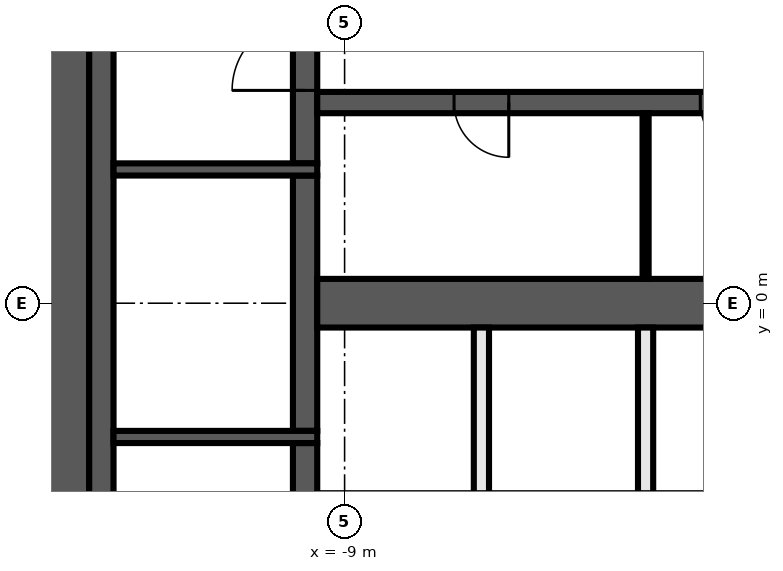
"""IFC4 building model, lengths in metres.
Left out: names, types, materials, properties, quantities, classifications, styles, units other than length and angle.
Written with IfcOpenShell. Run it as: python <this file> out.ifc"""

import sys

from ifc_helpers import new_model, si_unit, direction, frame, frame_2d, origin, place, context, subcontext, project, spatial, rectangle, extrude, element, fill, save


model = new_model("IFC4")
c1 = context("Model", 3, precision=1e-05, world=origin(), true_north=direction((0.0, 1.0)))
c2 = subcontext(c1, "Body", "Model", "MODEL_VIEW")
j1 = project(units=[si_unit("LENGTHUNIT", "METRE"), si_unit("PLANEANGLEUNIT", "RADIAN")], contexts=[c1])
p1 = place(None, origin())
s1 = spatial("IfcSite", under=j1, at=p1, CompositionType="ELEMENT")
p2 = place(p1, origin())
s2 = spatial("IfcBuilding", under=s1, at=p2, CompositionType="ELEMENT")
p3 = place(p2, frame((0.0, 0.0, 162.8)))
s3 = spatial("IfcBuildingStorey", under=s2, at=p3, CompositionType="ELEMENT", Elevation=162.8)
p4 = place(p3, frame((-13.6, -10.2, 0.0), z_axis=(0.0, 0.0, 1.0), x_axis=(0.0, 1.0, 0.0)))
e1 = element("IfcWall", 1, at=p4, inside=s3, PredefinedType="SHEAR", context=c2, shape_type="SweptSolid", body=[
    extrude(rectangle(XDim=20.4, YDim=0.8, at=frame_2d((10.2, 0.0))), origin(), (0.0, 0.0, 1.0), 3.82),
])
p5 = place(p3, frame((-13.0, -9.8, 0.0), z_axis=(0.0, 0.0, 1.0), x_axis=(0.0, 1.0, 0.0)))
e2 = element("IfcWall", 2, at=p5, inside=s3, PredefinedType="SHEAR", context=c2, shape_type="SweptSolid", body=[
    extrude(rectangle(XDim=19.6, YDim=0.4, at=frame_2d((9.8, 0.0))), origin(), (0.0, 0.0, 1.0), 3.82),
])
p6 = place(p3, frame((-9.65, -9.8, 0.0), z_axis=(0.0, 0.0, 1.0), x_axis=(0.0, 1.0, 0.0)))
e3 = element("IfcWall", 3, at=p6, inside=s3, PredefinedType="SHEAR", context=c2, shape_type="SweptSolid", body=[
    extrude(rectangle(XDim=7.5, YDim=0.4, at=frame_2d((3.75, 0.0))), origin(), (0.0, 0.0, 1.0), 3.82),
])
p7 = place(p6, frame((5.1, 0.0, 0.0)))
e4 = element("IfcOpeningElement", 4, at=p7, cuts=e3, PredefinedType="OPENING", context=c2, shape_type="SweptSolid", body=[
    extrude(rectangle(XDim=1.2, YDim=2.1, at=frame_2d((0.6, 1.05))), frame((0.0, 0.21, 0.0), z_axis=(0.0, -1.0, 0.0), x_axis=(1.0, 0.0, 0.0)), (0.0, 0.0, 1.0), 0.42),
])
p8 = place(p3, frame((-9.65, -2.1, 0.0), z_axis=(0.0, 0.0, 1.0), x_axis=(0.0, 1.0, 0.0)))
e5 = element("IfcWall", 5, at=p8, inside=s3, PredefinedType="SHEAR", context=c2, shape_type="SweptSolid", body=[
    extrude(rectangle(XDim=4.2, YDim=0.4, at=frame_2d((2.1, 0.0))), origin(), (0.0, 0.0, 1.0), 3.82),
])
p9 = place(p3, frame((-9.65, 2.3, 0.0), z_axis=(0.0, 0.0, 1.0), x_axis=(0.0, 1.0, 0.0)))
e6 = element("IfcWall", 6, at=p9, inside=s3, PredefinedType="SHEAR", context=c2, shape_type="SweptSolid", body=[
    extrude(rectangle(XDim=7.5, YDim=0.4, at=frame_2d((3.75, 0.0))), origin(), (0.0, 0.0, 1.0), 3.82),
])
p10 = place(p9, frame((1.2, 0.0, 0.0)))
e7 = element("IfcOpeningElement", 7, at=p10, cuts=e6, PredefinedType="OPENING", context=c2, shape_type="SweptSolid", body=[
    extrude(rectangle(XDim=1.2, YDim=2.1, at=frame_2d((0.6, 1.05))), frame((0.0, 0.21, 0.0), z_axis=(0.0, -1.0, 0.0), x_axis=(1.0, 0.0, 0.0)), (0.0, 0.0, 1.0), 0.42),
])
for number, where, z_axis, x_axis in (
    (8, (-9.45, 2.2, 0.0), (0.0, 0.0, 1.0), (-1.0, 0.0, 0.0)),
    (9, (-9.45, -2.2, 0.0), (0.0, 0.0, 1.0), (-1.0, 0.0, 0.0)),
):
    element("IfcWall", number, at=place(p3, frame(where, z_axis=z_axis, x_axis=x_axis)), inside=s3, PredefinedType="SHEAR", context=c2, shape_type="SweptSolid", body=[
        extrude(rectangle(XDim=3.35, YDim=0.2, at=frame_2d((1.675, 0.0))), origin(), (0.0, 0.0, 1.0), 3.82),
    ])
p11 = place(p3, frame((9.45, 3.3, 0.0), z_axis=(0.0, 0.0, 1.0), x_axis=(-1.0, 0.0, 0.0)))
e10 = element("IfcWall", 10, at=p11, inside=s3, PredefinedType="SHEAR", context=c2, shape_type="SweptSolid", body=[
    extrude(rectangle(XDim=18.9, YDim=0.35, at=frame_2d((9.45, 0.0))), origin(), (0.0, 0.0, 1.0), 3.82),
])
p12 = place(p11, frame((6.2, 0.0, 0.0)))
e11 = element("IfcOpeningElement", 11, at=p12, cuts=e10, PredefinedType="OPENING", context=c2, shape_type="SweptSolid", body=[
    extrude(rectangle(XDim=1.1, YDim=2.1, at=frame_2d((0.55, 1.05))), frame((0.0, 0.185, 0.0), z_axis=(0.0, -1.0, 0.0), x_axis=(1.0, 0.0, 0.0)), (0.0, 0.0, 1.0), 0.37),
])
p13 = place(p11, frame((3.5, 0.0, 0.0)))
e12 = element("IfcOpeningElement", 12, at=p13, cuts=e10, PredefinedType="OPENING", context=c2, shape_type="SweptSolid", body=[
    extrude(rectangle(XDim=1.1, YDim=2.1, at=frame_2d((0.55, 1.05))), frame((0.0, 0.185, 0.0), z_axis=(0.0, -1.0, 0.0), x_axis=(1.0, 0.0, 0.0)), (0.0, 0.0, 1.0), 0.37),
])
p14 = place(p11, frame((0.9, 0.0, 0.0)))
e13 = element("IfcOpeningElement", 13, at=p14, cuts=e10, PredefinedType="OPENING", context=c2, shape_type="SweptSolid", body=[
    extrude(rectangle(XDim=0.9, YDim=2.1, at=frame_2d((0.45, 1.05))), frame((0.0, 0.185, 0.0), z_axis=(0.0, -1.0, 0.0), x_axis=(1.0, 0.0, 0.0)), (0.0, 0.0, 1.0), 0.37),
])
p15 = place(p11, frame((15.75, 0.0, 0.0)))
e14 = element("IfcOpeningElement", 14, at=p15, cuts=e10, PredefinedType="OPENING", context=c2, shape_type="SweptSolid", body=[
    extrude(rectangle(XDim=0.9, YDim=2.1, at=frame_2d((0.45, 1.05))), frame((0.0, 0.185, 0.0), z_axis=(0.0, -1.0, 0.0), x_axis=(1.0, 0.0, 0.0)), (0.0, 0.0, 1.0), 0.37),
])
p16 = place(p11, frame((11.7, 0.0, 0.0)))
e15 = element("IfcOpeningElement", 15, at=p16, cuts=e10, PredefinedType="OPENING", context=c2, shape_type="SweptSolid", body=[
    extrude(rectangle(XDim=0.9, YDim=2.1, at=frame_2d((0.45, 1.05))), frame((0.0, 0.185, 0.0), z_axis=(0.0, -1.0, 0.0), x_axis=(1.0, 0.0, 0.0)), (0.0, 0.0, 1.0), 0.37),
])
p17 = place(p11, frame((9.0, 0.0, 0.0)))
e16 = element("IfcOpeningElement", 16, at=p17, cuts=e10, PredefinedType="OPENING", context=c2, shape_type="SweptSolid", body=[
    extrude(rectangle(XDim=0.9, YDim=2.1, at=frame_2d((0.45, 1.05))), frame((0.0, 0.185, 0.0), z_axis=(0.0, -1.0, 0.0), x_axis=(1.0, 0.0, 0.0)), (0.0, 0.0, 1.0), 0.37),
])
p18 = place(p3, frame((-9.45, 0.0, 0.0), z_axis=(0.0, 0.0, 1.0), x_axis=(1.0, 0.0, 0.0)))
e17 = element("IfcWall", 17, at=p18, inside=s3, PredefinedType="SHEAR", context=c2, shape_type="SweptSolid", body=[
    extrude(rectangle(XDim=18.9, YDim=0.8, at=frame_2d((9.45, 0.0))), origin(), (0.0, 0.0, 1.0), 3.82),
])
p19 = place(p3, frame((-4.05, 0.4, 0.0), z_axis=(0.0, 0.0, 1.0), x_axis=(0.0, 1.0, 0.0)))
e18 = element("IfcWall", 18, at=p19, inside=s3, PredefinedType="PARTITIONING", context=c2, shape_type="SweptSolid", body=[
    extrude(rectangle(XDim=2.725, YDim=0.1, at=frame_2d((1.363, 0.0))), origin(), (0.0, 0.0, 1.0), 3.82),
])
for number, where, z_axis, x_axis in (
    (19, (-4.05, -3.125, 0.0), (0.0, 0.0, 1.0), (0.0, 1.0, 0.0)),
    (20, (-6.75, -3.125, 0.0), (0.0, 0.0, 1.0), (0.0, 1.0, 0.0)),
):
    element("IfcWall", number, at=place(p3, frame(where, z_axis=z_axis, x_axis=x_axis)), inside=s3, PredefinedType="SOLIDWALL", context=c2, shape_type="SweptSolid", body=[
        extrude(rectangle(XDim=2.725, YDim=0.25, at=frame_2d((1.363, 0.0))), origin(), (0.0, 0.0, 1.0), 3.82),
    ])
p20 = place(p15, origin())
e21 = element("IfcDoor", 21, at=p20, inside=s3, OperationType="SINGLE_SWING_LEFT", PredefinedType="DOOR", context=c2, shape_type="SweptSolid", body=[
    extrude(rectangle(XDim=0.9, YDim=2.1, at=frame_2d((0.45, 1.05))), frame((0.0, 0.025, 0.0), z_axis=(0.0, -1.0, 0.0), x_axis=(1.0, 0.0, 0.0)), (0.0, 0.0, 1.0), 0.05),
])
fill(e14, e21)
p21 = place(p16, origin())
e22 = element("IfcDoor", 22, at=p21, inside=s3, OperationType="SINGLE_SWING_RIGHT", PredefinedType="DOOR", context=c2, shape_type="SweptSolid", body=[
    extrude(rectangle(XDim=0.9, YDim=2.1, at=frame_2d((0.45, 1.05))), frame((0.0, 0.025, 0.0), z_axis=(0.0, -1.0, 0.0), x_axis=(1.0, 0.0, 0.0)), (0.0, 0.0, 1.0), 0.05),
])
fill(e15, e22)
p22 = place(p10, origin())
e23 = element("IfcDoor", 23, at=p22, inside=s3, OperationType="SINGLE_SWING_RIGHT", PredefinedType="DOOR", context=c2, shape_type="SweptSolid", body=[
    extrude(rectangle(XDim=1.2, YDim=2.1, at=frame_2d((0.6, 1.05))), frame((0.0, 0.025, 0.0), z_axis=(0.0, -1.0, 0.0), x_axis=(1.0, 0.0, 0.0)), (0.0, 0.0, 1.0), 0.05),
])
fill(e7, e23)
save(model, sys.argv[1])
